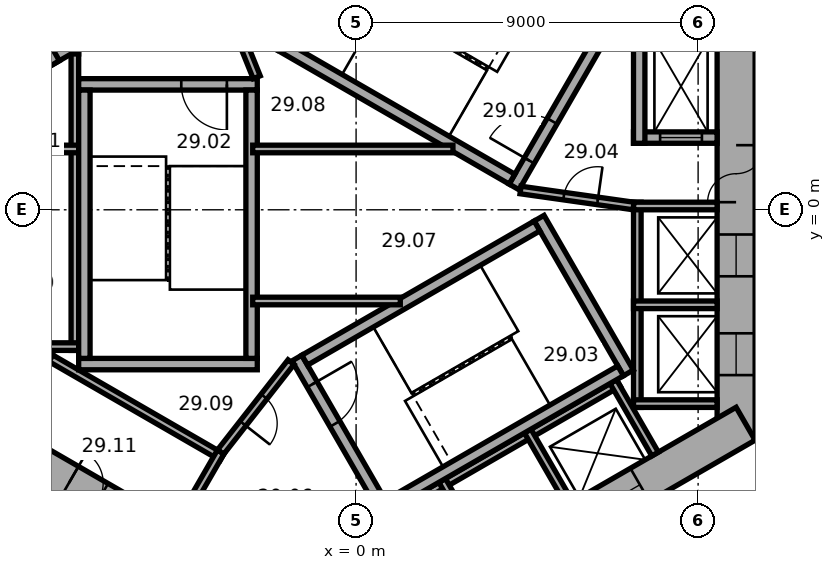
"""IFC4 building model, lengths in metres.
Left out: names, types, materials, properties, quantities, classifications, styles, units other than length and angle.
Written with IfcOpenShell. Run it as: python <this file> out.ifc"""

import sys

from ifc_helpers import new_model, si_unit, direction, frame, frame_2d, origin, place, context, subcontext, project, spatial, rectangle, extrude, element, fill, save


model = new_model("IFC4")
c1 = context("Model", 3, precision=1e-05, world=origin(), true_north=direction((0.0, 1.0)))
c2 = subcontext(c1, "Body", "Model", "MODEL_VIEW")
j1 = project(units=[si_unit("LENGTHUNIT", "METRE"), si_unit("PLANEANGLEUNIT", "RADIAN")], contexts=[c1])
p1 = place(None, origin())
s1 = spatial("IfcSite", under=j1, at=p1, CompositionType="ELEMENT")
p2 = place(p1, origin())
s2 = spatial("IfcBuilding", under=s1, at=p2, CompositionType="ELEMENT")
p3 = place(p2, frame((0.0, 0.0, 119.9)))
s3 = spatial("IfcBuildingStorey", under=s2, at=p3, CompositionType="ELEMENT", Elevation=119.9)
p4 = place(p3, frame((10.0, -6.062, 0.0), z_axis=(0.0, 0.0, 1.0), x_axis=(0.0, 1.0, 0.0)))
e1 = element("IfcWall", 1, at=p4, inside=s3, PredefinedType="SHEAR", context=c2, shape_type="SweptSolid", body=[
    extrude(rectangle(XDim=12.125, YDim=1.0, at=frame_2d((6.062, 0.0))), origin(), (0.0, 0.0, 1.0), 4.5),
])
p5 = place(p4, frame((6.262, 0.0, 0.0)))
e2 = element("IfcOpeningElement", 2, at=p5, cuts=e1, PredefinedType="OPENING", context=c2, shape_type="SweptSolid", body=[
    extrude(rectangle(XDim=1.5, YDim=2.1, at=frame_2d((0.75, 1.05))), frame((0.0, 0.51, 0.0), z_axis=(0.0, -1.0, 0.0), x_axis=(1.0, 0.0, 0.0)), (0.0, 0.0, 1.0), 1.02),
])
p6 = place(p4, frame((1.712, 0.0, 0.0)))
e3 = element("IfcOpeningElement", 3, at=p6, cuts=e1, PredefinedType="OPENING", context=c2, shape_type="SweptSolid", body=[
    extrude(rectangle(XDim=1.1, YDim=2.1, at=frame_2d((0.55, 1.05))), frame((0.0, 0.51, 0.0), z_axis=(0.0, -1.0, 0.0), x_axis=(1.0, 0.0, 0.0)), (0.0, 0.0, 1.0), 1.02),
])
p7 = place(p4, frame((4.312, 0.0, 0.0)))
e4 = element("IfcOpeningElement", 4, at=p7, cuts=e1, PredefinedType="OPENING", context=c2, shape_type="SweptSolid", body=[
    extrude(rectangle(XDim=1.1, YDim=2.1, at=frame_2d((0.55, 1.05))), frame((0.0, 0.51, 0.0), z_axis=(0.0, -1.0, 0.0), x_axis=(1.0, 0.0, 0.0)), (0.0, 0.0, 1.0), 1.02),
])
p8 = place(p3, frame((-10.25, -5.629, 0.0), z_axis=(0.0, 0.0, 1.0), x_axis=(0.866022616891, -0.50000482701, 0.0)))
e5 = element("IfcWall", 5, at=p8, inside=s3, PredefinedType="SHEAR", context=c2, shape_type="SweptSolid", body=[
    extrude(rectangle(XDim=12.125, YDim=1.0, at=frame_2d((6.062, 0.0))), origin(), (0.0, 0.0, 1.0), 4.5),
])
p9 = place(p8, frame((6.262, 0.0, 0.0)))
e6 = element("IfcOpeningElement", 6, at=p9, cuts=e5, PredefinedType="OPENING", context=c2, shape_type="SweptSolid", body=[
    extrude(rectangle(XDim=1.5, YDim=2.1, at=frame_2d((0.75, 1.05))), frame((0.0, 0.51, 0.0), z_axis=(0.0, -1.0, 0.0), x_axis=(1.0, 0.0, 0.0)), (0.0, 0.0, 1.0), 1.02),
])
p10 = place(p8, frame((3.112, 0.0, 0.0)))
e7 = element("IfcOpeningElement", 7, at=p10, cuts=e5, PredefinedType="OPENING", context=c2, shape_type="SweptSolid", body=[
    extrude(rectangle(XDim=0.9, YDim=2.1, at=frame_2d((0.45, 1.05))), frame((0.0, 0.51, 0.0), z_axis=(0.0, -1.0, 0.0), x_axis=(1.0, 0.0, 0.0)), (0.0, 0.0, 1.0), 1.02),
])
p11 = place(p3, frame((-0.25, -11.691, 0.0), z_axis=(0.0, 0.0, 1.0), x_axis=(0.866022616891, 0.50000482701, 0.0)))
e8 = element("IfcWall", 8, at=p11, inside=s3, PredefinedType="SHEAR", context=c2, shape_type="SweptSolid", body=[
    extrude(rectangle(XDim=12.125, YDim=1.0, at=frame_2d((6.062, 0.0))), origin(), (0.0, 0.0, 1.0), 4.5),
])
p12 = place(p11, frame((2.712, 0.0, 0.0)))
e9 = element("IfcOpeningElement", 9, at=p12, cuts=e8, PredefinedType="OPENING", context=c2, shape_type="SweptSolid", body=[
    extrude(rectangle(XDim=0.9, YDim=2.1, at=frame_2d((0.45, 1.05))), frame((0.0, 0.51, 0.0), z_axis=(0.0, -1.0, 0.0), x_axis=(1.0, 0.0, 0.0)), (0.0, 0.0, 1.0), 1.02),
])
p13 = place(p11, frame((5.312, 0.0, 0.0)))
e10 = element("IfcOpeningElement", 10, at=p13, cuts=e8, PredefinedType="OPENING", context=c2, shape_type="SweptSolid", body=[
    extrude(rectangle(XDim=0.9, YDim=2.1, at=frame_2d((0.45, 1.05))), frame((0.0, 0.51, 0.0), z_axis=(0.0, -1.0, 0.0), x_axis=(1.0, 0.0, 0.0)), (0.0, 0.0, 1.0), 1.02),
])
p14 = place(p11, frame((7.812, 0.0, 0.0)))
e11 = element("IfcOpeningElement", 11, at=p14, cuts=e8, PredefinedType="OPENING", context=c2, shape_type="SweptSolid", body=[
    extrude(rectangle(XDim=1.1, YDim=2.1, at=frame_2d((0.55, 1.05))), frame((0.0, 0.51, 0.0), z_axis=(0.0, -1.0, 0.0), x_axis=(1.0, 0.0, 0.0)), (0.0, 0.0, 1.0), 1.02),
])
p15 = place(p3, frame((7.4, -5.2, 0.0), z_axis=(0.0, 0.0, 1.0), x_axis=(0.0, 1.0, 0.0)))
e12 = element("IfcWall", 12, at=p15, inside=s3, PredefinedType="PARTITIONING", context=c2, shape_type="SweptSolid", body=[
    extrude(rectangle(XDim=5.4, YDim=0.2, at=frame_2d((2.7, 0.0))), origin(), (0.0, 0.0, 1.0), 4.22),
])
for number, where, z_axis, x_axis in (
    (13, (7.3, -5.1, 0.0), (0.0, 0.0, 1.0), (1.0, 0.0, 0.0)),
    (14, (7.3, -2.5, 0.0), (0.0, 0.0, 1.0), (1.0, 0.0, 0.0)),
    (15, (7.3, 0.1, 0.0), (0.0, 0.0, 1.0), (1.0, 0.0, 0.0)),
):
    element("IfcWall", number, at=place(p3, frame(where, z_axis=z_axis, x_axis=x_axis)), inside=s3, PredefinedType="PARTITIONING", context=c2, shape_type="SweptSolid", body=[
        extrude(rectangle(XDim=2.2, YDim=0.2, at=frame_2d((1.1, 0.0))), origin(), (0.0, 0.0, 1.0), 4.22),
    ])
p16 = place(p3, frame((-7.4, 4.3, 0.0), z_axis=(0.0, 0.0, 1.0), x_axis=(0.0, -1.0, 0.0)))
e16 = element("IfcWall", 16, at=p16, inside=s3, PredefinedType="PARTITIONING", context=c2, shape_type="SweptSolid", body=[
    extrude(rectangle(XDim=8.0, YDim=0.2, at=frame_2d((4.0, 0.0))), origin(), (0.0, 0.0, 1.0), 4.22),
])
for number, where, z_axis, x_axis in (
    (17, (-7.3, 4.2, 0.0), (0.0, 0.0, 1.0), (-1.0, 0.0, 0.0)),
    (18, (-7.3, 1.6, 0.0), (0.0, 0.0, 1.0), (-1.0, 0.0, 0.0)),
    (19, (-7.3, -3.6, 0.0), (0.0, 0.0, 1.0), (-1.0, 0.0, 0.0)),
):
    element("IfcWall", number, at=place(p3, frame(where, z_axis=z_axis, x_axis=x_axis)), inside=s3, PredefinedType="PARTITIONING", context=c2, shape_type="SweptSolid", body=[
        extrude(rectangle(XDim=2.2, YDim=0.2, at=frame_2d((1.1, 0.0))), origin(), (0.0, 0.0, 1.0), 4.22),
    ])
p17 = place(p3, frame((-8.203, -3.809, 0.0), z_axis=(0.0, 0.0, 1.0), x_axis=(0.866028230842, -0.499995103361, 0.0)))
e20 = element("IfcWall", 20, at=p17, inside=s3, PredefinedType="PARTITIONING", context=c2, shape_type="SweptSolid", body=[
    extrude(rectangle(XDim=5.4, YDim=0.2, at=frame_2d((2.7, 0.0))), origin(), (0.0, 0.0, 1.0), 4.22),
])
p18 = place(p3, frame((-8.067, -3.772, 0.0), z_axis=(0.0, 0.0, 1.0), x_axis=(-0.50002983664, -0.866008176907, 0.0)))
e21 = element("IfcWall", 21, at=p18, inside=s3, PredefinedType="PARTITIONING", context=c2, shape_type="SweptSolid", body=[
    extrude(rectangle(XDim=2.2, YDim=0.2, at=frame_2d((1.1, 0.0))), origin(), (0.0, 0.0, 1.0), 4.22),
])
p19 = place(p3, frame((-3.563, -6.372, 0.0), z_axis=(0.0, 0.0, 1.0), x_axis=(-0.499994660107, -0.866028486751, 0.0)))
e22 = element("IfcWall", 22, at=p19, inside=s3, PredefinedType="PARTITIONING", context=c2, shape_type="SweptSolid", body=[
    extrude(rectangle(XDim=2.2, YDim=0.2, at=frame_2d((1.1, 0.0))), origin(), (0.0, 0.0, 1.0), 4.22),
])
p20 = place(p3, frame((-0.024, -8.559, 0.0), z_axis=(0.0, 0.0, 1.0), x_axis=(0.866026010844, 0.49999894854, 0.0)))
e23 = element("IfcWall", 23, at=p20, inside=s3, PredefinedType="PARTITIONING", context=c2, shape_type="SweptSolid", body=[
    extrude(rectangle(XDim=8.0, YDim=0.2, at=frame_2d((4.0, 0.0))), origin(), (0.0, 0.0, 1.0), 4.22),
])
for number, where, z_axis, x_axis in (
    (24, (2.264, -7.122, 0.0), (0.0, 0.0, 1.0), (0.5, -0.866, 0.0)),
    (25, (4.516, -5.822, 0.0), (0.0, 0.0, 1.0), (0.5, -0.866, 0.0)),
    (26, (6.768, -4.522, 0.0), (0.0, 0.0, 1.0), (0.5, -0.866, 0.0)),
):
    element("IfcWall", number, at=place(p3, frame(where, z_axis=z_axis, x_axis=x_axis)), inside=s3, PredefinedType="PARTITIONING", context=c2, shape_type="SweptSolid", body=[
        extrude(rectangle(XDim=2.2, YDim=0.2, at=frame_2d((1.1, 0.0))), origin(), (0.0, 0.0, 1.0), 4.22),
    ])
p21 = place(p3, frame((4.158, 0.602, 0.0), z_axis=(0.0, 0.0, 1.0), x_axis=(0.499977259774, 0.866038532462, 0.0)))
e27 = element("IfcWall", 27, at=p21, inside=s3, PredefinedType="SHEAR", context=c2, shape_type="SweptSolid", body=[
    extrude(rectangle(XDim=4.7, YDim=0.3, at=frame_2d((2.35, 0.0))), origin(), (0.0, 0.0, 1.0), 4.22),
])
p22 = place(p21, frame((0.8, 0.0, 0.0)))
e28 = element("IfcOpeningElement", 28, at=p22, cuts=e27, PredefinedType="OPENING", context=c2, shape_type="SweptSolid", body=[
    extrude(rectangle(XDim=1.2, YDim=2.1, at=frame_2d((0.6, 1.05))), frame((0.0, 0.16, 0.0), z_axis=(0.0, -1.0, 0.0), x_axis=(1.0, 0.0, 0.0)), (0.0, 0.0, 1.0), 0.32),
])
p23 = place(p3, frame((4.103, 0.807, 0.0), z_axis=(0.0, 0.0, 1.0), x_axis=(-0.866027801685, 0.499995846692, 0.0)))
e29 = element("IfcWall", 29, at=p23, inside=s3, PredefinedType="SHEAR", context=c2, shape_type="SweptSolid", body=[
    extrude(rectangle(XDim=7.06, YDim=0.3, at=frame_2d((3.53, 0.0))), origin(), (0.0, 0.0, 1.0), 4.22),
])
p24 = place(p3, frame((-2.6, 3.3, 0.0), z_axis=(0.0, 0.0, 1.0), x_axis=(-1.0, 0.0, 0.0)))
e30 = element("IfcWall", 30, at=p24, inside=s3, PredefinedType="SHEAR", context=c2, shape_type="SweptSolid", body=[
    extrude(rectangle(XDim=4.7, YDim=0.3, at=frame_2d((2.35, 0.0))), origin(), (0.0, 0.0, 1.0), 4.22),
])
p25 = place(p24, frame((0.8, 0.0, 0.0)))
e31 = element("IfcOpeningElement", 31, at=p25, cuts=e30, PredefinedType="OPENING", context=c2, shape_type="SweptSolid", body=[
    extrude(rectangle(XDim=1.2, YDim=2.1, at=frame_2d((0.6, 1.05))), frame((0.0, 0.16, 0.0), z_axis=(0.0, -1.0, 0.0), x_axis=(1.0, 0.0, 0.0)), (0.0, 0.0, 1.0), 0.32),
])
p26 = place(p3, frame((-2.6, -4.06, 0.0), z_axis=(0.0, 0.0, 1.0), x_axis=(-1.0, 0.0, 0.0)))
e32 = element("IfcWall", 32, at=p26, inside=s3, PredefinedType="SHEAR", context=c2, shape_type="SweptSolid", body=[
    extrude(rectangle(XDim=4.7, YDim=0.3, at=frame_2d((2.35, 0.0))), origin(), (0.0, 0.0, 1.0), 4.22),
])
for number, where, z_axis, x_axis in (
    (33, (-2.75, 3.15, 0.0), (0.0, 0.0, 1.0), (0.0, -1.0, 0.0)),
    (34, (-7.15, 3.15, 0.0), (0.0, 0.0, 1.0), (0.0, -1.0, 0.0)),
):
    element("IfcWall", number, at=place(p3, frame(where, z_axis=z_axis, x_axis=x_axis)), inside=s3, PredefinedType="SHEAR", context=c2, shape_type="SweptSolid", body=[
        extrude(rectangle(XDim=7.06, YDim=0.3, at=frame_2d((3.53, 0.0))), origin(), (0.0, 0.0, 1.0), 4.22),
    ])
p27 = place(p3, frame((-1.558, -3.902, 0.0), z_axis=(0.0, 0.0, 1.0), x_axis=(0.499977259774, -0.866038532462, 0.0)))
e35 = element("IfcWall", 35, at=p27, inside=s3, PredefinedType="SHEAR", context=c2, shape_type="SweptSolid", body=[
    extrude(rectangle(XDim=4.7, YDim=0.3, at=frame_2d((2.35, 0.0))), origin(), (0.0, 0.0, 1.0), 4.22),
])
p28 = place(p27, frame((0.8, 0.0, 0.0)))
e36 = element("IfcOpeningElement", 36, at=p28, cuts=e35, PredefinedType="OPENING", context=c2, shape_type="SweptSolid", body=[
    extrude(rectangle(XDim=1.2, YDim=2.1, at=frame_2d((0.6, 1.05))), frame((0.0, 0.16, 0.0), z_axis=(0.0, -1.0, 0.0), x_axis=(1.0, 0.0, 0.0)), (0.0, 0.0, 1.0), 0.32),
])
p29 = place(p3, frame((4.816, -0.222, 0.0), z_axis=(0.0, 0.0, 1.0), x_axis=(0.499977259774, -0.866038532462, 0.0)))
e37 = element("IfcWall", 37, at=p29, inside=s3, PredefinedType="SHEAR", context=c2, shape_type="SweptSolid", body=[
    extrude(rectangle(XDim=4.7, YDim=0.3, at=frame_2d((2.35, 0.0))), origin(), (0.0, 0.0, 1.0), 4.22),
])
for number, where, z_axis, x_axis in (
    (38, (-1.353, -3.957, 0.0), (0.0, 0.0, 1.0), (0.866, 0.5, 0.0)),
    (39, (0.847, -7.767, 0.0), (0.0, 0.0, 1.0), (0.866, 0.5, 0.0)),
):
    element("IfcWall", number, at=place(p3, frame(where, z_axis=z_axis, x_axis=x_axis)), inside=s3, PredefinedType="SHEAR", context=c2, shape_type="SweptSolid", body=[
        extrude(rectangle(XDim=7.06, YDim=0.3, at=frame_2d((3.53, 0.0))), origin(), (0.0, 0.0, 1.0), 4.22),
    ])
p30 = place(p3, frame((7.3, 1.9, 0.0), z_axis=(0.0, 0.0, 1.0), x_axis=(1.0, 0.0, 0.0)))
e40 = element("IfcWall", 40, at=p30, inside=s3, PredefinedType="SHEAR", context=c2, shape_type="SweptSolid", body=[
    extrude(rectangle(XDim=2.2, YDim=0.3, at=frame_2d((1.1, 0.0))), origin(), (0.0, 0.0, 1.0), 4.22),
])
p31 = place(p30, frame((0.7, 0.0, 0.0)))
e41 = element("IfcOpeningElement", 41, at=p31, cuts=e40, PredefinedType="OPENING", context=c2, shape_type="SweptSolid", body=[
    extrude(rectangle(XDim=1.1, YDim=2.1, at=frame_2d((0.55, 1.05))), frame((0.0, 0.16, 0.0), z_axis=(0.0, -1.0, 0.0), x_axis=(1.0, 0.0, 0.0)), (0.0, 0.0, 1.0), 0.32),
])
p32 = place(p3, frame((7.45, 1.75, 0.0), z_axis=(0.0, 0.0, 1.0), x_axis=(0.0, 1.0, 0.0)))
e42 = element("IfcWall", 42, at=p32, inside=s3, PredefinedType="SHEAR", context=c2, shape_type="SweptSolid", body=[
    extrude(rectangle(XDim=3.35, YDim=0.3, at=frame_2d((1.675, 0.0))), origin(), (0.0, 0.0, 1.0), 4.22),
])
p33 = place(p3, frame((4.327, 0.521, 0.0), z_axis=(0.0, 0.0, 1.0), x_axis=(0.990124376366, -0.14019172346, 0.0)))
e43 = element("IfcWall", 43, at=p33, inside=s3, PredefinedType="PARTITIONING", context=c2, shape_type="SweptSolid", body=[
    extrude(rectangle(XDim=3.002, YDim=0.2, at=frame_2d((1.501, 0.0))), origin(), (0.0, 0.0, 1.0), 4.22),
])
p34 = place(p33, frame((1.15, 0.0, 0.0)))
e44 = element("IfcOpeningElement", 44, at=p34, cuts=e43, PredefinedType="OPENING", context=c2, shape_type="SweptSolid", body=[
    extrude(rectangle(XDim=0.9, YDim=2.1, at=frame_2d((0.45, 1.05))), frame((0.0, 0.11, 0.0), z_axis=(0.0, -1.0, 0.0), x_axis=(1.0, 0.0, 0.0)), (0.0, 0.0, 1.0), 0.22),
])
p35 = place(p3, frame((-5.24, 5.577, 0.0), z_axis=(0.0, 0.0, 1.0), x_axis=(-0.866014461049, -0.500018952895, 0.0)))
e45 = element("IfcWall", 45, at=p35, inside=s3, PredefinedType="SHEAR", context=c2, shape_type="SweptSolid", body=[
    extrude(rectangle(XDim=3.35, YDim=0.3, at=frame_2d((1.675, 0.0))), origin(), (0.0, 0.0, 1.0), 4.22),
])
p36 = place(p3, frame((-7.937, 3.847, 0.0), z_axis=(0.0, 0.0, 1.0), x_axis=(-0.50002983664, 0.866008176907, 0.0)))
e46 = element("IfcWall", 46, at=p36, inside=s3, PredefinedType="SHEAR", context=c2, shape_type="SweptSolid", body=[
    extrude(rectangle(XDim=2.2, YDim=0.3, at=frame_2d((1.1, 0.0))), origin(), (0.0, 0.0, 1.0), 4.22),
])
p37 = place(p3, frame((-2.615, 3.487, 0.0), z_axis=(0.0, 0.0, 1.0), x_axis=(-0.373576831041, 0.92759924068, 0.0)))
e47 = element("IfcWall", 47, at=p37, inside=s3, PredefinedType="PARTITIONING", context=c2, shape_type="SweptSolid", body=[
    extrude(rectangle(XDim=3.002, YDim=0.2, at=frame_2d((1.501, 0.0))), origin(), (0.0, 0.0, 1.0), 4.22),
])
p38 = place(p37, frame((1.15, 0.0, 0.0)))
e48 = element("IfcOpeningElement", 48, at=p38, cuts=e47, PredefinedType="OPENING", context=c2, shape_type="SweptSolid", body=[
    extrude(rectangle(XDim=0.9, YDim=2.1, at=frame_2d((0.45, 1.05))), frame((0.0, 0.11, 0.0), z_axis=(0.0, -1.0, 0.0), x_axis=(1.0, 0.0, 0.0)), (0.0, 0.0, 1.0), 0.22),
])
p39 = place(p3, frame((-1.712, -4.008, 0.0), z_axis=(0.0, 0.0, 1.0), x_axis=(-0.616549420702, -0.787316208287, 0.0)))
e49 = element("IfcWall", 49, at=p39, inside=s3, PredefinedType="PARTITIONING", context=c2, shape_type="SweptSolid", body=[
    extrude(rectangle(XDim=3.002, YDim=0.2, at=frame_2d((1.501, 0.0))), origin(), (0.0, 0.0, 1.0), 4.22),
])
p40 = place(p39, frame((1.15, 0.0, 0.0)))
e50 = element("IfcOpeningElement", 50, at=p40, cuts=e49, PredefinedType="OPENING", context=c2, shape_type="SweptSolid", body=[
    extrude(rectangle(XDim=0.9, YDim=2.1, at=frame_2d((0.45, 1.05))), frame((0.0, 0.11, 0.0), z_axis=(0.0, -1.0, 0.0), x_axis=(1.0, 0.0, 0.0)), (0.0, 0.0, 1.0), 0.22),
])
p41 = place(p3, frame((-2.72, -2.4, 0.0), z_axis=(0.0, 0.0, 1.0), x_axis=(1.0, 0.0, 0.0)))
e51 = element("IfcWall", 51, at=p41, inside=s3, PredefinedType="PARTITIONING", context=c2, shape_type="SweptSolid", body=[
    extrude(rectangle(XDim=3.883, YDim=0.2, at=frame_2d((1.941, 0.0))), origin(), (0.0, 0.0, 1.0), 4.22),
])
p42 = place(p3, frame((-2.72, 1.6, 0.0), z_axis=(0.0, 0.0, 1.0), x_axis=(1.0, 0.0, 0.0)))
e52 = element("IfcWall", 52, at=p42, inside=s3, PredefinedType="PARTITIONING", context=c2, shape_type="SweptSolid", body=[
    extrude(rectangle(XDim=5.269, YDim=0.2, at=frame_2d((2.634, 0.0))), origin(), (0.0, 0.0, 1.0), 4.22),
])
p43 = place(p5, origin())
e53 = element("IfcDoor", 53, at=p43, inside=s3, OperationType="DOUBLE_DOOR_SINGLE_SWING", PredefinedType="DOOR", context=c2, shape_type="SweptSolid", body=[
    extrude(rectangle(XDim=1.5, YDim=2.1, at=frame_2d((0.75, 1.05))), frame((0.0, 0.025, 0.0), z_axis=(0.0, -1.0, 0.0), x_axis=(1.0, 0.0, 0.0)), (0.0, 0.0, 1.0), 0.05),
])
fill(e2, e53)
p44 = place(p22, origin())
e54 = element("IfcDoor", 54, at=p44, inside=s3, OperationType="SINGLE_SWING_RIGHT", PredefinedType="DOOR", context=c2, shape_type="SweptSolid", body=[
    extrude(rectangle(XDim=1.2, YDim=2.1, at=frame_2d((0.6, 1.05))), frame((0.0, 0.025, 0.0), z_axis=(0.0, -1.0, 0.0), x_axis=(1.0, 0.0, 0.0)), (0.0, 0.0, 1.0), 0.05),
])
fill(e28, e54)
p45 = place(p25, origin())
e55 = element("IfcDoor", 55, at=p45, inside=s3, OperationType="SINGLE_SWING_RIGHT", PredefinedType="DOOR", context=c2, shape_type="SweptSolid", body=[
    extrude(rectangle(XDim=1.2, YDim=2.1, at=frame_2d((0.6, 1.05))), frame((0.0, 0.025, 0.0), z_axis=(0.0, -1.0, 0.0), x_axis=(1.0, 0.0, 0.0)), (0.0, 0.0, 1.0), 0.05),
])
fill(e31, e55)
p46 = place(p28, origin())
e56 = element("IfcDoor", 56, at=p46, inside=s3, OperationType="SINGLE_SWING_RIGHT", PredefinedType="DOOR", context=c2, shape_type="SweptSolid", body=[
    extrude(rectangle(XDim=1.2, YDim=2.1, at=frame_2d((0.6, 1.05))), frame((0.0, 0.025, 0.0), z_axis=(0.0, -1.0, 0.0), x_axis=(1.0, 0.0, 0.0)), (0.0, 0.0, 1.0), 0.05),
])
fill(e36, e56)
p47 = place(p34, origin())
e57 = element("IfcDoor", 57, at=p47, inside=s3, OperationType="SINGLE_SWING_LEFT", PredefinedType="DOOR", context=c2, shape_type="SweptSolid", body=[
    extrude(rectangle(XDim=0.9, YDim=2.1, at=frame_2d((0.45, 1.05))), frame((0.0, 0.025, 0.0), z_axis=(0.0, -1.0, 0.0), x_axis=(1.0, 0.0, 0.0)), (0.0, 0.0, 1.0), 0.05),
])
fill(e44, e57)
p48 = place(p40, origin())
e58 = element("IfcDoor", 58, at=p48, inside=s3, OperationType="SINGLE_SWING_LEFT", PredefinedType="DOOR", context=c2, shape_type="SweptSolid", body=[
    extrude(rectangle(XDim=0.9, YDim=2.1, at=frame_2d((0.45, 1.05))), frame((0.0, 0.025, 0.0), z_axis=(0.0, -1.0, 0.0), x_axis=(1.0, 0.0, 0.0)), (0.0, 0.0, 1.0), 0.05),
])
fill(e50, e58)
p49 = place(p10, origin())
e59 = element("IfcDoor", 59, at=p49, inside=s3, OperationType="SINGLE_SWING_LEFT", PredefinedType="DOOR", context=c2, shape_type="SweptSolid", body=[
    extrude(rectangle(XDim=0.9, YDim=2.1, at=frame_2d((0.45, 1.05))), frame((0.0, 0.025, 0.0), z_axis=(0.0, -1.0, 0.0), x_axis=(1.0, 0.0, 0.0)), (0.0, 0.0, 1.0), 0.05),
])
fill(e7, e59)
p50 = place(p31, origin())
e60 = element("IfcDoor", 60, at=p50, inside=s3, OperationType="DOUBLE_DOOR_SLIDING", PredefinedType="DOOR", context=c2, shape_type="SweptSolid", body=[
    extrude(rectangle(XDim=1.1, YDim=2.1, at=frame_2d((0.55, 1.05))), frame((0.0, 0.025, 0.0), z_axis=(0.0, -1.0, 0.0), x_axis=(1.0, 0.0, 0.0)), (0.0, 0.0, 1.0), 0.05),
])
fill(e41, e60)
p51 = place(p6, origin())
e61 = element("IfcDoor", 61, at=p51, inside=s3, OperationType="DOUBLE_DOOR_SLIDING", PredefinedType="DOOR", context=c2, shape_type="SweptSolid", body=[
    extrude(rectangle(XDim=1.1, YDim=2.1, at=frame_2d((0.55, 1.05))), frame((0.0, 0.025, 0.0), z_axis=(0.0, -1.0, 0.0), x_axis=(1.0, 0.0, 0.0)), (0.0, 0.0, 1.0), 0.05),
])
fill(e3, e61)
p52 = place(p7, origin())
e62 = element("IfcDoor", 62, at=p52, inside=s3, OperationType="DOUBLE_DOOR_SLIDING", PredefinedType="DOOR", context=c2, shape_type="SweptSolid", body=[
    extrude(rectangle(XDim=1.1, YDim=2.1, at=frame_2d((0.55, 1.05))), frame((0.0, 0.025, 0.0), z_axis=(0.0, -1.0, 0.0), x_axis=(1.0, 0.0, 0.0)), (0.0, 0.0, 1.0), 0.05),
])
fill(e4, e62)
p53 = place(p14, origin())
e63 = element("IfcDoor", 63, at=p53, inside=s3, OperationType="DOUBLE_DOOR_SLIDING", PredefinedType="DOOR", context=c2, shape_type="SweptSolid", body=[
    extrude(rectangle(XDim=1.1, YDim=2.1, at=frame_2d((0.55, 1.05))), frame((0.0, 0.025, 0.0), z_axis=(0.0, -1.0, 0.0), x_axis=(1.0, 0.0, 0.0)), (0.0, 0.0, 1.0), 0.05),
])
fill(e11, e63)
save(model, sys.argv[1])
